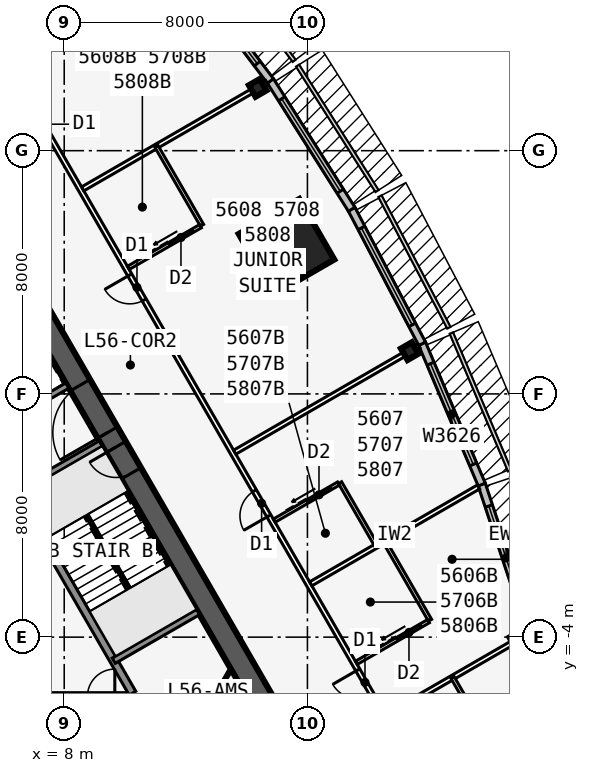
"""IFC4 building model, lengths in metres.
Left out: names, types, materials, properties, quantities, classifications, styles, units other than length and angle.
Written with IfcOpenShell. Run it as: python <this file> out.ifc"""

import sys

from ifc_helpers import new_model, si_unit, direction, frame, frame_2d, origin, origin_2d, place, context, subcontext, project, spatial, rectangle, i_section, extrude, element, fill, save


model = new_model("IFC4")
c1 = context("Model", 3, precision=1e-05, world=origin(), true_north=direction((0.0, 1.0)))
c2 = subcontext(c1, "Body", "Model", "MODEL_VIEW")
j1 = project(units=[si_unit("LENGTHUNIT", "METRE"), si_unit("PLANEANGLEUNIT", "RADIAN")], contexts=[c1])
p1 = place(None, origin())
s1 = spatial("IfcSite", under=j1, at=p1, CompositionType="ELEMENT")
p2 = place(p1, origin())
s2 = spatial("IfcBuilding", under=s1, at=p2, CompositionType="ELEMENT")
p3 = place(p2, frame((0.0, 0.0, 211.7)))
s3 = spatial("IfcBuildingStorey", under=s2, at=p3, CompositionType="ELEMENT", Elevation=211.7)
p4 = place(p3, frame((-0.55, -5.951, 0.0), z_axis=(0.0, 0.0, 1.0), x_axis=(1.0, 0.0, 0.0)))
e1 = element("IfcWall", 1, at=p4, inside=s3, PredefinedType="SOLIDWALL", context=c2, shape_type="SweptSolid", body=[
    extrude(rectangle(XDim=10.733, YDim=0.25, at=frame_2d((5.366, 0.0))), origin(), (0.0, 0.0, 1.0), 3.435),
])
p5 = place(p4, frame((9.314, 0.0, 0.0)))
e2 = element("IfcOpeningElement", 2, at=p5, cuts=e1, PredefinedType="OPENING", context=c2, shape_type="SweptSolid", body=[
    extrude(rectangle(XDim=0.9, YDim=2.13, at=frame_2d((0.45, 1.065))), frame((0.0, 0.135, 0.0), z_axis=(0.0, -1.0, 0.0), x_axis=(1.0, 0.0, 0.0)), (0.0, 0.0, 1.0), 0.27),
])
p6 = place(p4, frame((1.05, 0.0, 0.0)))
e3 = element("IfcOpeningElement", 3, at=p6, cuts=e1, PredefinedType="OPENING", context=c2, shape_type="SweptSolid", body=[
    extrude(rectangle(XDim=1.1, YDim=2.13, at=frame_2d((0.55, 1.065))), frame((0.0, 0.135, 0.0), z_axis=(0.0, -1.0, 0.0), x_axis=(1.0, 0.0, 0.0)), (0.0, 0.0, 1.0), 0.27),
])
p7 = place(p4, frame((4.05, 0.0, 0.0)))
e4 = element("IfcOpeningElement", 4, at=p7, cuts=e1, PredefinedType="OPENING", context=c2, shape_type="SweptSolid", body=[
    extrude(rectangle(XDim=1.1, YDim=2.13, at=frame_2d((0.55, 1.065))), frame((0.0, 0.135, 0.0), z_axis=(0.0, -1.0, 0.0), x_axis=(1.0, 0.0, 0.0)), (0.0, 0.0, 1.0), 0.27),
])
p8 = place(p3, frame((16.5, -9.526, 0.0), z_axis=(0.0, 0.0, 1.0), x_axis=(-0.499999749417, 0.866025548458, 0.0)))
e5 = element("IfcWall", 5, at=p8, inside=s3, PredefinedType="SHEAR", context=c2, shape_type="SweptSolid", body=[
    extrude(rectangle(XDim=33.0, YDim=0.75, at=frame_2d((16.5, 0.0))), origin(), (0.0, 0.0, 1.0), 3.6),
])
p9 = place(p8, frame((14.15, 0.0, 0.0)))
e6 = element("IfcOpeningElement", 6, at=p9, cuts=e5, PredefinedType="OPENING", context=c2, shape_type="SweptSolid", body=[
    extrude(rectangle(XDim=1.8, YDim=2.13, at=frame_2d((0.9, 1.065))), frame((0.0, 0.385, 0.0), z_axis=(0.0, -1.0, 0.0), x_axis=(1.0, 0.0, 0.0)), (0.0, 0.0, 1.0), 0.77),
])
p10 = place(p8, frame((12.6, 0.0, 0.0)))
e7 = element("IfcOpeningElement", 7, at=p10, cuts=e5, PredefinedType="OPENING", context=c2, shape_type="SweptSolid", body=[
    extrude(rectangle(XDim=1.0, YDim=2.13, at=frame_2d((0.5, 1.065))), frame((0.0, 0.385, 0.0), z_axis=(0.0, -1.0, 0.0), x_axis=(1.0, 0.0, 0.0)), (0.0, 0.0, 1.0), 0.77),
])
p11 = place(p3, frame((10.245, -5.843, 0.0), z_axis=(0.0, 0.0, 1.0), x_axis=(-0.499993009313, 0.866029439822, 0.0)))
e8 = element("IfcWall", 8, at=p11, inside=s3, PredefinedType="SOLIDWALL", context=c2, shape_type="SweptSolid", body=[
    extrude(rectangle(XDim=7.733, YDim=0.25, at=frame_2d((3.866, 0.0))), origin(), (0.0, 0.0, 1.0), 3.435),
])
for number, where, z_axis, x_axis in (
    (9, (9.629, -4.775, 0.0), (0.0, 0.0, 1.0), (0.866, 0.5, 0.0)),
    (10, (6.429, 0.767, 0.0), (0.0, 0.0, 1.0), (0.866, 0.5, 0.0)),
):
    element("IfcWall", number, at=place(p3, frame(where, z_axis=z_axis, x_axis=x_axis)), inside=s3, PredefinedType="SOLIDWALL", context=c2, shape_type="SweptSolid", body=[
        extrude(rectangle(XDim=3.2, YDim=0.2, at=frame_2d((1.6, 0.0))), origin(), (0.0, 0.0, 1.0), 3.435),
    ])
p12 = place(p3, frame((5.329, 2.673, 0.0), z_axis=(0.0, 0.0, 1.0), x_axis=(0.866022944154, 0.50000426018, 0.0)))
e11 = element("IfcWall", 11, at=p12, inside=s3, PredefinedType="SOLIDWALL", context=c2, shape_type="SweptSolid", body=[
    extrude(rectangle(XDim=3.2, YDim=0.2, at=frame_2d((1.6, 0.0))), origin(), (0.0, 0.0, 1.0), 3.435),
])
for number, where, z_axis, x_axis in (
    (12, (19.363, 5.406, 0.0), (0.0, 0.0, 1.0), (0.866, 0.5, 0.0)),
    (13, (14.363, 14.066, 0.0), (0.0, 0.0, 1.0), (0.866, 0.5, 0.0)),
):
    element("IfcColumn", number, at=place(p3, frame(where, z_axis=z_axis, x_axis=x_axis)), inside=s3, PredefinedType="COLUMN", context=c2, shape_type="SweptSolid", body=[
        extrude(i_section(OverallWidth=0.411, OverallDepth=0.434, WebThickness=0.036, FlangeThickness=0.057, at=origin_2d()), origin(), (0.0, 0.0, 1.0), 3.6),
    ])
p13 = place(p3, frame((15.312, 8.84, 0.0), z_axis=(0.0, 0.0, 1.0), x_axis=(0.866025403784, 0.5, 0.0)))
e14 = element("IfcColumn", 14, at=p13, inside=s3, PredefinedType="COLUMN", context=c2, shape_type="SweptSolid", body=[
    extrude(rectangle(XDim=2.3, YDim=2.3, at=origin_2d()), origin(), (0.0, 0.0, 1.0), 3.6),
])
p14 = place(p3, frame((23.338, -3.817, 0.0), z_axis=(0.0, 0.0, 1.0), x_axis=(-0.315108478109, 0.949055660656, 0.0)))
e15 = element("IfcWall", 15, at=p14, inside=s3, PredefinedType="STANDARD", context=c2, shape_type="SweptSolid", body=[
    extrude(rectangle(XDim=5.105, YDim=0.25, at=frame_2d((2.552, 0.0))), origin(), (0.0, 0.0, 1.0), 3.435),
])
p15 = place(p14, frame((0.752, 0.0, 0.45)))
e16 = element("IfcOpeningElement", 16, at=p15, cuts=e15, PredefinedType="OPENING", context=c2, shape_type="SweptSolid", body=[
    extrude(rectangle(XDim=3.6, YDim=2.6, at=frame_2d((1.8, 1.3))), frame((0.0, 0.135, 0.0), z_axis=(0.0, -1.0, 0.0), x_axis=(1.0, 0.0, 0.0)), (0.0, 0.0, 1.0), 0.27),
])
p16 = place(p3, frame((21.733, 1.018, 0.0), z_axis=(0.0, 0.0, 1.0), x_axis=(-0.390096809471, 0.920773848044, 0.0)))
e17 = element("IfcWall", 17, at=p16, inside=s3, PredefinedType="STANDARD", context=c2, shape_type="SweptSolid", body=[
    extrude(rectangle(XDim=5.038, YDim=0.25, at=frame_2d((2.519, 0.0))), origin(), (0.0, 0.0, 1.0), 3.435),
])
p17 = place(p16, frame((0.719, 0.0, 0.45)))
e18 = element("IfcOpeningElement", 18, at=p17, cuts=e17, PredefinedType="OPENING", context=c2, shape_type="SweptSolid", body=[
    extrude(rectangle(XDim=3.6, YDim=2.6, at=frame_2d((1.8, 1.3))), frame((0.0, 0.135, 0.0), z_axis=(0.0, -1.0, 0.0), x_axis=(1.0, 0.0, 0.0)), (0.0, 0.0, 1.0), 0.27),
])
p18 = place(p3, frame((19.772, 5.648, 0.0), z_axis=(0.0, 0.0, 1.0), x_axis=(-0.463976002579, 0.885847768542, 0.0)))
e19 = element("IfcWall", 19, at=p18, inside=s3, PredefinedType="STANDARD", context=c2, shape_type="SweptSolid", body=[
    extrude(rectangle(XDim=5.004, YDim=0.25, at=frame_2d((2.502, 0.0))), origin(), (0.0, 0.0, 1.0), 3.435),
])
p19 = place(p18, frame((0.702, 0.0, 0.45)))
e20 = element("IfcOpeningElement", 20, at=p19, cuts=e19, PredefinedType="OPENING", context=c2, shape_type="SweptSolid", body=[
    extrude(rectangle(XDim=3.6, YDim=2.6, at=frame_2d((1.8, 1.3))), frame((0.0, 0.135, 0.0), z_axis=(0.0, -1.0, 0.0), x_axis=(1.0, 0.0, 0.0)), (0.0, 0.0, 1.0), 0.27),
])
p20 = place(p3, frame((17.456, 10.072, 0.0), z_axis=(0.0, 0.0, 1.0), x_axis=(-0.535220361449, 0.844712474568, 0.0)))
e21 = element("IfcWall", 21, at=p20, inside=s3, PredefinedType="STANDARD", context=c2, shape_type="SweptSolid", body=[
    extrude(rectangle(XDim=5.004, YDim=0.25, at=frame_2d((2.502, 0.0))), origin(), (0.0, 0.0, 1.0), 3.435),
])
p21 = place(p20, frame((0.702, 0.0, 0.45)))
e22 = element("IfcOpeningElement", 22, at=p21, cuts=e21, PredefinedType="OPENING", context=c2, shape_type="SweptSolid", body=[
    extrude(rectangle(XDim=3.6, YDim=2.6, at=frame_2d((1.8, 1.3))), frame((0.0, 0.135, 0.0), z_axis=(0.0, -1.0, 0.0), x_axis=(1.0, 0.0, 0.0)), (0.0, 0.0, 1.0), 0.27),
])
p22 = place(p3, frame((14.783, 14.291, 0.0), z_axis=(0.0, 0.0, 1.0), x_axis=(-0.602408653511, 0.798187831388, 0.0)))
e23 = element("IfcWall", 23, at=p22, inside=s3, PredefinedType="STANDARD", context=c2, shape_type="SweptSolid", body=[
    extrude(rectangle(XDim=5.038, YDim=0.25, at=frame_2d((2.519, 0.0))), origin(), (0.0, 0.0, 1.0), 3.435),
])
p23 = place(p22, frame((0.719, 0.0, 0.45)))
e24 = element("IfcOpeningElement", 24, at=p23, cuts=e23, PredefinedType="OPENING", context=c2, shape_type="SweptSolid", body=[
    extrude(rectangle(XDim=3.6, YDim=2.6, at=frame_2d((1.8, 1.3))), frame((0.0, 0.135, 0.0), z_axis=(0.0, -1.0, 0.0), x_axis=(1.0, 0.0, 0.0)), (0.0, 0.0, 1.0), 0.27),
])
p24 = place(p3, frame((21.661, -12.015, 0.0), z_axis=(0.0, 0.0, 1.0), x_axis=(-0.500000605707, 0.866025054079, 0.0)))
e25 = element("IfcWall", 25, at=p24, inside=s3, PredefinedType="PARTITIONING", context=c2, shape_type="SweptSolid", body=[
    extrude(rectangle(XDim=42.472, YDim=0.15, at=frame_2d((21.236, 0.0))), origin(), (0.0, 0.0, 1.0), 3.435),
])
p25 = place(p24, frame((2.661, 0.0, 0.0)))
e26 = element("IfcOpeningElement", 26, at=p25, cuts=e25, PredefinedType="OPENING", context=c2, shape_type="SweptSolid", body=[
    extrude(rectangle(XDim=0.95, YDim=2.13, at=frame_2d((0.475, 1.065))), frame((0.0, 0.085, 0.0), z_axis=(0.0, -1.0, 0.0), x_axis=(1.0, 0.0, 0.0)), (0.0, 0.0, 1.0), 0.17),
])
p26 = place(p24, frame((7.061, 0.0, 0.0)))
e27 = element("IfcOpeningElement", 27, at=p26, cuts=e25, PredefinedType="OPENING", context=c2, shape_type="SweptSolid", body=[
    extrude(rectangle(XDim=0.95, YDim=2.13, at=frame_2d((0.475, 1.065))), frame((0.0, 0.085, 0.0), z_axis=(0.0, -1.0, 0.0), x_axis=(1.0, 0.0, 0.0)), (0.0, 0.0, 1.0), 0.17),
])
p27 = place(p24, frame((13.861, 0.0, 0.0)))
e28 = element("IfcOpeningElement", 28, at=p27, cuts=e25, PredefinedType="OPENING", context=c2, shape_type="SweptSolid", body=[
    extrude(rectangle(XDim=0.95, YDim=2.13, at=frame_2d((0.475, 1.065))), frame((0.0, 0.085, 0.0), z_axis=(0.0, -1.0, 0.0), x_axis=(1.0, 0.0, 0.0)), (0.0, 0.0, 1.0), 0.17),
])
p28 = place(p24, frame((22.061, 0.0, 0.0)))
e29 = element("IfcOpeningElement", 29, at=p28, cuts=e25, PredefinedType="OPENING", context=c2, shape_type="SweptSolid", body=[
    extrude(rectangle(XDim=0.95, YDim=2.13, at=frame_2d((0.475, 1.065))), frame((0.0, 0.085, 0.0), z_axis=(0.0, -1.0, 0.0), x_axis=(1.0, 0.0, 0.0)), (0.0, 0.0, 1.0), 0.17),
])
p29 = place(p24, frame((28.261, 0.0, 0.0)))
e30 = element("IfcOpeningElement", 30, at=p29, cuts=e25, PredefinedType="OPENING", context=c2, shape_type="SweptSolid", body=[
    extrude(rectangle(XDim=0.95, YDim=2.13, at=frame_2d((0.475, 1.065))), frame((0.0, 0.085, 0.0), z_axis=(0.0, -1.0, 0.0), x_axis=(1.0, 0.0, 0.0)), (0.0, 0.0, 1.0), 0.17),
])
p30 = place(p24, frame((38.861, 0.0, 0.0)))
e31 = element("IfcOpeningElement", 31, at=p30, cuts=e25, PredefinedType="OPENING", context=c2, shape_type="SweptSolid", body=[
    extrude(rectangle(XDim=0.95, YDim=2.13, at=frame_2d((0.475, 1.065))), frame((0.0, 0.085, 0.0), z_axis=(0.0, -1.0, 0.0), x_axis=(1.0, 0.0, 0.0)), (0.0, 0.0, 1.0), 0.17),
])
p31 = place(p3, frame((18.608, -6.577, 0.0), z_axis=(0.0, 0.0, 1.0), x_axis=(0.866028745538, 0.499994211868, 0.0)))
e32 = element("IfcWall", 32, at=p31, inside=s3, PredefinedType="PARTITIONING", context=c2, shape_type="SweptSolid", body=[
    extrude(rectangle(XDim=5.34, YDim=0.15, at=frame_2d((2.67, 0.0))), origin(), (0.0, 0.0, 1.0), 2.589),
])
p32 = place(p3, frame((16.108, -2.247, 0.0), z_axis=(0.0, 0.0, 1.0), x_axis=(0.866035028144, 0.499983329749, 0.0)))
e33 = element("IfcWall", 33, at=p32, inside=s3, PredefinedType="PARTITIONING", context=c2, shape_type="SweptSolid", body=[
    extrude(rectangle(XDim=6.373, YDim=0.15, at=frame_2d((3.187, 0.0))), origin(), (0.0, 0.0, 1.0), 2.589),
])
p33 = place(p3, frame((13.608, 2.083, 0.0), z_axis=(0.0, 0.0, 1.0), x_axis=(0.866032701937, 0.499987359016, 0.0)))
e34 = element("IfcWall", 34, at=p33, inside=s3, PredefinedType="PARTITIONING", context=c2, shape_type="SweptSolid", body=[
    extrude(rectangle(XDim=6.994, YDim=0.15, at=frame_2d((3.497, 0.0))), origin(), (0.0, 0.0, 1.0), 2.589),
])
p34 = place(p3, frame((8.608, 10.743, 0.0), z_axis=(0.0, 0.0, 1.0), x_axis=(0.86604781716, 0.499961176886, 0.0)))
e35 = element("IfcWall", 35, at=p34, inside=s3, PredefinedType="PARTITIONING", context=c2, shape_type="SweptSolid", body=[
    extrude(rectangle(XDim=6.994, YDim=0.15, at=frame_2d((3.497, 0.0))), origin(), (0.0, 0.0, 1.0), 2.589),
])
p35 = place(p3, frame((6.108, 15.073, 0.0), z_axis=(0.0, 0.0, 1.0), x_axis=(0.866035028144, 0.499983329749, 0.0)))
e36 = element("IfcWall", 36, at=p35, inside=s3, PredefinedType="PARTITIONING", context=c2, shape_type="SweptSolid", body=[
    extrude(rectangle(XDim=6.373, YDim=0.1, at=frame_2d((3.187, 0.0))), origin(), (0.0, 0.0, 1.0), 2.589),
])
p36 = place(p35, frame((0.45, 0.0, 0.0)))
e37 = element("IfcOpeningElement", 37, at=p36, cuts=e36, PredefinedType="OPENING", context=c2, shape_type="SweptSolid", body=[
    extrude(rectangle(XDim=0.9, YDim=2.13, at=frame_2d((0.45, 1.065))), frame((0.0, 0.06, 0.0), z_axis=(0.0, -1.0, 0.0), x_axis=(1.0, 0.0, 0.0)), (0.0, 0.0, 1.0), 0.12),
])
p37 = place(p3, frame((21.973, -7.406, 0.0), z_axis=(0.0, 0.0, 1.0), x_axis=(-0.499957262057, 0.866050077142, 0.0)))
e38 = element("IfcWall", 38, at=p37, inside=s3, PredefinedType="PLUMBINGWALL", context=c2, shape_type="SweptSolid", body=[
    extrude(rectangle(XDim=2.4, YDim=0.12, at=frame_2d((1.2, 0.0))), origin(), (0.0, 0.0, 1.0), 3.435),
])
p38 = place(p3, frame((20.033, -3.445, 0.0), z_axis=(0.0, 0.0, 1.0), x_axis=(-0.499990139034, 0.866031096941, 0.0)))
e39 = element("IfcWall", 39, at=p38, inside=s3, PredefinedType="PLUMBINGWALL", context=c2, shape_type="SweptSolid", body=[
    extrude(rectangle(XDim=3.0, YDim=0.12, at=frame_2d((1.5, 0.0))), origin(), (0.0, 0.0, 1.0), 3.435),
])
p39 = place(p3, frame((17.608, -4.845, 0.0), z_axis=(0.0, 0.0, 1.0), x_axis=(0.865997131366, 0.500048966069, 0.0)))
e40 = element("IfcWall", 40, at=p39, inside=s3, PredefinedType="PLUMBINGWALL", context=c2, shape_type="SweptSolid", body=[
    extrude(rectangle(XDim=2.74, YDim=0.12, at=frame_2d((1.37, 0.0))), origin(), (0.0, 0.0, 1.0), 3.435),
])
p40 = place(p39, frame((1.55, 0.0, 0.0)))
e41 = element("IfcOpeningElement", 41, at=p40, cuts=e40, PredefinedType="OPENING", context=c2, shape_type="SweptSolid", body=[
    extrude(rectangle(XDim=0.9, YDim=2.13, at=frame_2d((0.45, 1.065))), frame((0.0, 0.07, 0.0), z_axis=(0.0, -1.0, 0.0), x_axis=(1.0, 0.0, 0.0)), (0.0, 0.0, 1.0), 0.14),
])
p41 = place(p3, frame((18.273, -0.997, 0.0), z_axis=(0.0, 0.0, 1.0), x_axis=(-0.500001309137, 0.866024647952, 0.0)))
e42 = element("IfcWall", 42, at=p41, inside=s3, PredefinedType="PLUMBINGWALL", context=c2, shape_type="SweptSolid", body=[
    extrude(rectangle(XDim=2.4, YDim=0.12, at=frame_2d((1.2, 0.0))), origin(), (0.0, 0.0, 1.0), 3.435),
])
p42 = place(p3, frame((14.908, -0.169, 0.0), z_axis=(0.0, 0.0, 1.0), x_axis=(0.866023955769, 0.500002508028, 0.0)))
e43 = element("IfcWall", 43, at=p42, inside=s3, PredefinedType="PLUMBINGWALL", context=c2, shape_type="SweptSolid", body=[
    extrude(rectangle(XDim=2.44, YDim=0.12, at=frame_2d((1.22, 0.0))), origin(), (0.0, 0.0, 1.0), 3.435),
])
p43 = place(p42, frame((1.25, 0.0, 0.0)))
e44 = element("IfcOpeningElement", 44, at=p43, cuts=e43, PredefinedType="OPENING", context=c2, shape_type="SweptSolid", body=[
    extrude(rectangle(XDim=0.9, YDim=2.13, at=frame_2d((0.45, 1.065))), frame((0.0, 0.07, 0.0), z_axis=(0.0, -1.0, 0.0), x_axis=(1.0, 0.0, 0.0)), (0.0, 0.0, 1.0), 0.14),
])
p44 = place(p3, frame((12.533, 9.545, 0.0), z_axis=(0.0, 0.0, 1.0), x_axis=(-0.499990139034, 0.866031096941, 0.0)))
e45 = element("IfcWall", 45, at=p44, inside=s3, PredefinedType="PLUMBINGWALL", context=c2, shape_type="SweptSolid", body=[
    extrude(rectangle(XDim=3.0, YDim=0.12, at=frame_2d((1.5, 0.0))), origin(), (0.0, 0.0, 1.0), 3.435),
])
p45 = place(p3, frame((10.108, 8.145, 0.0), z_axis=(0.0, 0.0, 1.0), x_axis=(0.866035715982, 0.499982138324, 0.0)))
e46 = element("IfcWall", 46, at=p45, inside=s3, PredefinedType="PLUMBINGWALL", context=c2, shape_type="SweptSolid", body=[
    extrude(rectangle(XDim=2.74, YDim=0.12, at=frame_2d((1.37, 0.0))), origin(), (0.0, 0.0, 1.0), 3.435),
])
p46 = place(p45, frame((1.55, 0.0, 0.0)))
e47 = element("IfcOpeningElement", 47, at=p46, cuts=e46, PredefinedType="OPENING", context=c2, shape_type="SweptSolid", body=[
    extrude(rectangle(XDim=0.9, YDim=2.13, at=frame_2d((0.45, 1.065))), frame((0.0, 0.07, 0.0), z_axis=(0.0, -1.0, 0.0), x_axis=(1.0, 0.0, 0.0)), (0.0, 0.0, 1.0), 0.14),
])
p47 = place(p3, frame((13.483, -5.051, 0.0), z_axis=(0.0, 0.0, 1.0), x_axis=(-0.499999210213, -0.866025859768, 0.0)))
e48 = element("IfcWall", 48, at=p47, inside=s3, PredefinedType="PARTITIONING", context=c2, shape_type="SweptSolid", body=[
    extrude(rectangle(XDim=4.734, YDim=0.1, at=frame_2d((2.367, 0.0))), origin(), (0.0, 0.0, 1.0), 3.435),
])
p48 = place(p47, frame((1.917, 0.0, 0.0)))
e49 = element("IfcOpeningElement", 49, at=p48, cuts=e48, PredefinedType="OPENING", context=c2, shape_type="SweptSolid", body=[
    extrude(rectangle(XDim=0.9, YDim=2.13, at=frame_2d((0.45, 1.065))), frame((0.0, 0.06, 0.0), z_axis=(0.0, -1.0, 0.0), x_axis=(1.0, 0.0, 0.0)), (0.0, 0.0, 1.0), 0.12),
])
p49 = place(p3, frame((10.135, -2.401, 0.0), z_axis=(0.0, 0.0, 1.0), x_axis=(-0.499992232847, 0.866029888106, 0.0)))
e50 = element("IfcWall", 50, at=p49, inside=s3, PredefinedType="SOLIDWALL", context=c2, shape_type="SweptSolid", body=[
    extrude(rectangle(XDim=2.794, YDim=0.1, at=frame_2d((1.397, 0.0))), origin(), (0.0, 0.0, 1.0), 3.6),
])
p50 = place(p15, origin())
e51 = element("IfcWindow", 51, at=p50, inside=s3, PartitioningType="SINGLE_PANEL", PredefinedType="WINDOW", context=c2, shape_type="SweptSolid", body=[
    extrude(rectangle(XDim=3.6, YDim=2.6, at=frame_2d((1.8, 1.3))), frame((0.0, 0.03, 0.0), z_axis=(0.0, -1.0, 0.0), x_axis=(1.0, 0.0, 0.0)), (0.0, 0.0, 1.0), 0.06),
])
fill(e16, e51)
p51 = place(p17, origin())
e52 = element("IfcWindow", 52, at=p51, inside=s3, PartitioningType="SINGLE_PANEL", PredefinedType="WINDOW", context=c2, shape_type="SweptSolid", body=[
    extrude(rectangle(XDim=3.6, YDim=2.6, at=frame_2d((1.8, 1.3))), frame((0.0, 0.03, 0.0), z_axis=(0.0, -1.0, 0.0), x_axis=(1.0, 0.0, 0.0)), (0.0, 0.0, 1.0), 0.06),
])
fill(e18, e52)
p52 = place(p19, origin())
e53 = element("IfcWindow", 53, at=p52, inside=s3, PartitioningType="SINGLE_PANEL", PredefinedType="WINDOW", context=c2, shape_type="SweptSolid", body=[
    extrude(rectangle(XDim=3.6, YDim=2.6, at=frame_2d((1.8, 1.3))), frame((0.0, 0.03, 0.0), z_axis=(0.0, -1.0, 0.0), x_axis=(1.0, 0.0, 0.0)), (0.0, 0.0, 1.0), 0.06),
])
fill(e20, e53)
p53 = place(p21, origin())
e54 = element("IfcWindow", 54, at=p53, inside=s3, PartitioningType="SINGLE_PANEL", PredefinedType="WINDOW", context=c2, shape_type="SweptSolid", body=[
    extrude(rectangle(XDim=3.6, YDim=2.6, at=frame_2d((1.8, 1.3))), frame((0.0, 0.03, 0.0), z_axis=(0.0, -1.0, 0.0), x_axis=(1.0, 0.0, 0.0)), (0.0, 0.0, 1.0), 0.06),
])
fill(e22, e54)
p54 = place(p23, origin())
e55 = element("IfcWindow", 55, at=p54, inside=s3, PartitioningType="SINGLE_PANEL", PredefinedType="WINDOW", context=c2, shape_type="SweptSolid", body=[
    extrude(rectangle(XDim=3.6, YDim=2.6, at=frame_2d((1.8, 1.3))), frame((0.0, 0.03, 0.0), z_axis=(0.0, -1.0, 0.0), x_axis=(1.0, 0.0, 0.0)), (0.0, 0.0, 1.0), 0.06),
])
fill(e24, e55)
p55 = place(p40, origin())
e56 = element("IfcDoor", 56, at=p55, inside=s3, OperationType="SLIDING_TO_LEFT", PredefinedType="DOOR", context=c2, shape_type="SweptSolid", body=[
    extrude(rectangle(XDim=0.9, YDim=2.13, at=frame_2d((0.45, 1.065))), frame((0.0, 0.025, 0.0), z_axis=(0.0, -1.0, 0.0), x_axis=(1.0, 0.0, 0.0)), (0.0, 0.0, 1.0), 0.05),
])
fill(e41, e56)
p56 = place(p26, origin())
e57 = element("IfcDoor", 57, at=p56, inside=s3, OperationType="SINGLE_SWING_RIGHT", PredefinedType="DOOR", context=c2, shape_type="SweptSolid", body=[
    extrude(rectangle(XDim=0.95, YDim=2.13, at=frame_2d((0.475, 1.065))), frame((0.0, 0.025, 0.0), z_axis=(0.0, -1.0, 0.0), x_axis=(1.0, 0.0, 0.0)), (0.0, 0.0, 1.0), 0.05),
])
fill(e27, e57)
p57 = place(p43, origin())
e58 = element("IfcDoor", 58, at=p57, inside=s3, OperationType="SLIDING_TO_LEFT", PredefinedType="DOOR", context=c2, shape_type="SweptSolid", body=[
    extrude(rectangle(XDim=0.9, YDim=2.13, at=frame_2d((0.45, 1.065))), frame((0.0, 0.025, 0.0), z_axis=(0.0, -1.0, 0.0), x_axis=(1.0, 0.0, 0.0)), (0.0, 0.0, 1.0), 0.05),
])
fill(e44, e58)
p58 = place(p27, origin())
e59 = element("IfcDoor", 59, at=p58, inside=s3, OperationType="SINGLE_SWING_LEFT", PredefinedType="DOOR", context=c2, shape_type="SweptSolid", body=[
    extrude(rectangle(XDim=0.95, YDim=2.13, at=frame_2d((0.475, 1.065))), frame((0.0, 0.025, 0.0), z_axis=(0.0, -1.0, 0.0), x_axis=(1.0, 0.0, 0.0)), (0.0, 0.0, 1.0), 0.05),
])
fill(e28, e59)
p59 = place(p46, origin())
e60 = element("IfcDoor", 60, at=p59, inside=s3, OperationType="SLIDING_TO_LEFT", PredefinedType="DOOR", context=c2, shape_type="SweptSolid", body=[
    extrude(rectangle(XDim=0.9, YDim=2.13, at=frame_2d((0.45, 1.065))), frame((0.0, 0.025, 0.0), z_axis=(0.0, -1.0, 0.0), x_axis=(1.0, 0.0, 0.0)), (0.0, 0.0, 1.0), 0.05),
])
fill(e47, e60)
p60 = place(p28, origin())
e61 = element("IfcDoor", 61, at=p60, inside=s3, OperationType="SINGLE_SWING_RIGHT", PredefinedType="DOOR", context=c2, shape_type="SweptSolid", body=[
    extrude(rectangle(XDim=0.95, YDim=2.13, at=frame_2d((0.475, 1.065))), frame((0.0, 0.025, 0.0), z_axis=(0.0, -1.0, 0.0), x_axis=(1.0, 0.0, 0.0)), (0.0, 0.0, 1.0), 0.05),
])
fill(e29, e61)
p61 = place(p9, origin())
e62 = element("IfcDoor", 62, at=p61, inside=s3, OperationType="DOUBLE_DOOR_SINGLE_SWING", PredefinedType="DOOR", context=c2, shape_type="SweptSolid", body=[
    extrude(rectangle(XDim=1.8, YDim=2.13, at=frame_2d((0.9, 1.065))), frame((0.0, 0.025, 0.0), z_axis=(0.0, -1.0, 0.0), x_axis=(1.0, 0.0, 0.0)), (0.0, 0.0, 1.0), 0.05),
])
fill(e6, e62)
p62 = place(p10, origin())
e63 = element("IfcDoor", 63, at=p62, inside=s3, OperationType="SINGLE_SWING_RIGHT", PredefinedType="DOOR", context=c2, shape_type="SweptSolid", body=[
    extrude(rectangle(XDim=1.0, YDim=2.13, at=frame_2d((0.5, 1.065))), frame((0.0, 0.025, 0.0), z_axis=(0.0, -1.0, 0.0), x_axis=(1.0, 0.0, 0.0)), (0.0, 0.0, 1.0), 0.05),
])
fill(e7, e63)
save(model, sys.argv[1])
